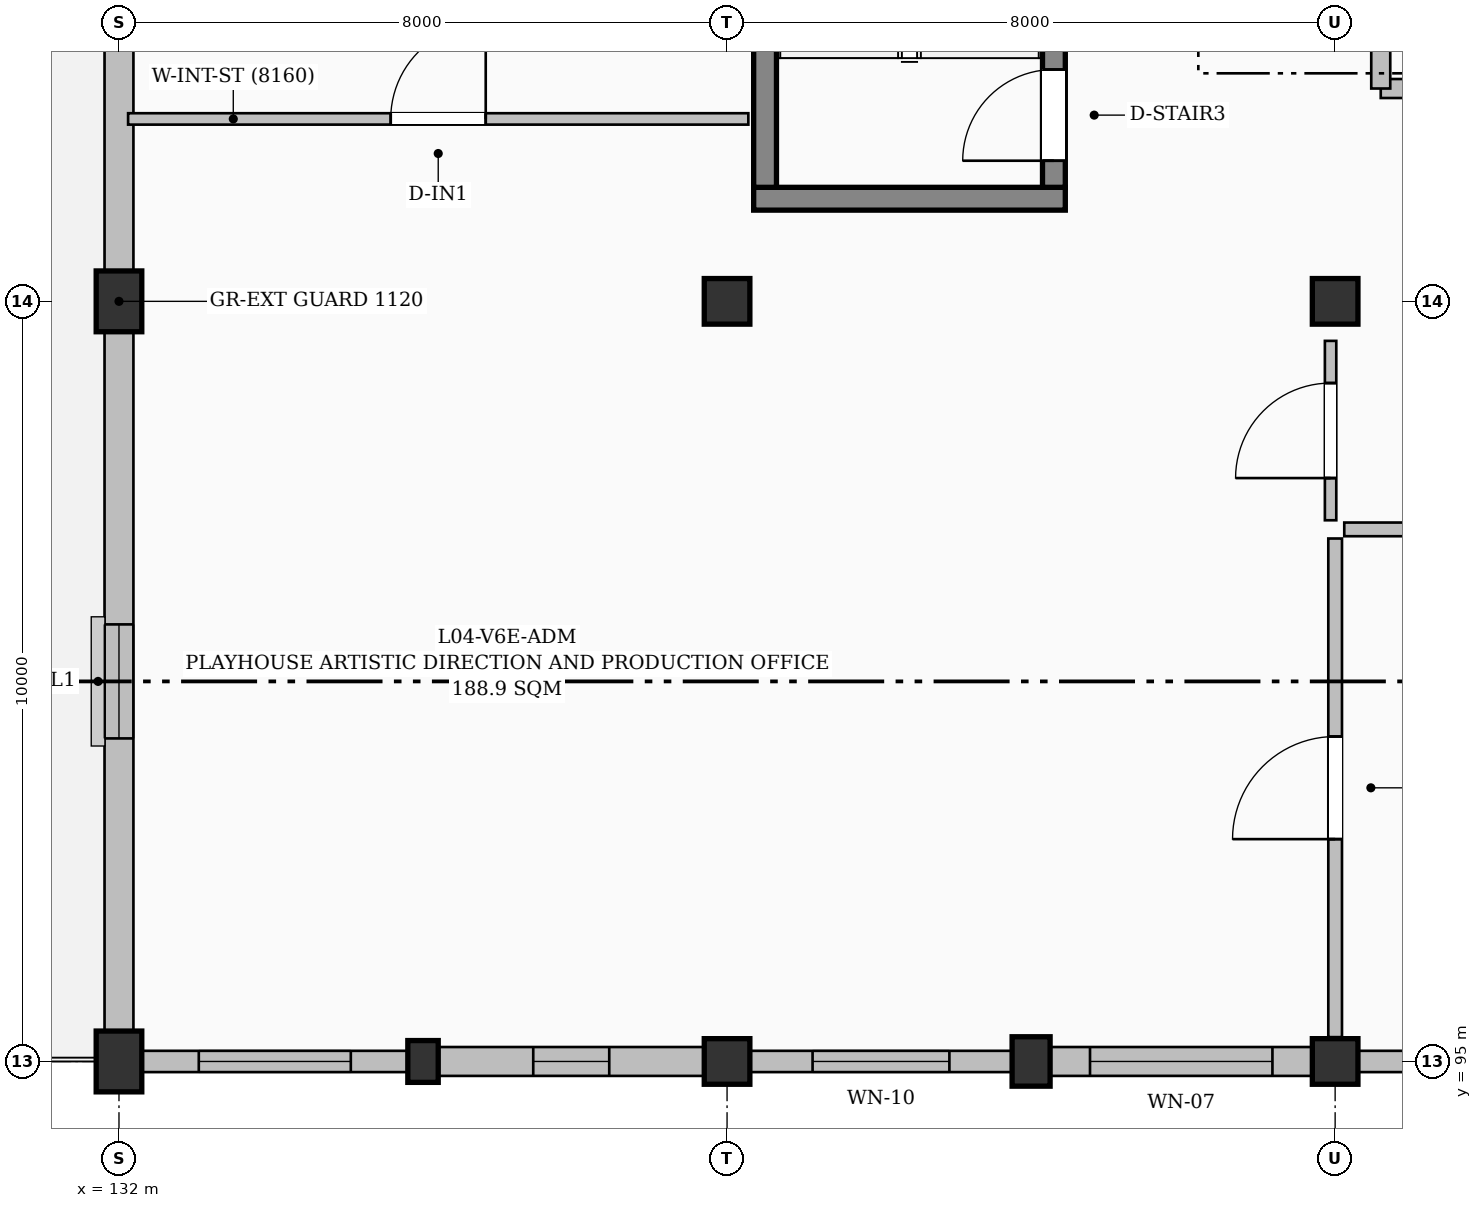
"""IFC4 building model, lengths in metres.
Left out: names, types, materials, properties, quantities, classifications, styles, units other than length and angle.
Written with IfcOpenShell. Run it as: python <this file> out.ifc"""

import sys

from ifc_helpers import new_model, si_unit, direction, frame, frame_2d, origin, origin_2d, place, context, subcontext, project, spatial, rectangle, extrude, element, fill, save


model = new_model("IFC4")
c1 = context("Model", 3, precision=1e-05, world=origin(), true_north=direction((0.0, 1.0)))
c2 = subcontext(c1, "Body", "Model", "MODEL_VIEW")
j1 = project(units=[si_unit("LENGTHUNIT", "METRE"), si_unit("PLANEANGLEUNIT", "RADIAN")], contexts=[c1])
p1 = place(None, origin())
s1 = spatial("IfcSite", under=j1, at=p1, CompositionType="ELEMENT")
p2 = place(p1, origin())
s2 = spatial("IfcBuilding", under=s1, at=p2, CompositionType="ELEMENT")
p3 = place(p2, frame((0.0, 0.0, 18.3)))
s3 = spatial("IfcBuildingStorey", under=s2, at=p3, CompositionType="ELEMENT", Elevation=18.3)
for number, where, z_axis, x_axis in (
    (1, (132.0, 95.0, 0.0), (0.0, 0.0, 1.0), (1.0, 0.0, 0.0)),
    (2, (132.0, 105.0, 0.0), (0.0, 0.0, 1.0), (1.0, 0.0, 0.0)),
):
    element("IfcColumn", number, at=place(p3, frame(where, z_axis=z_axis, x_axis=x_axis)), inside=s3, PredefinedType="COLUMN", context=c2, shape_type="SweptSolid", body=[
        extrude(rectangle(XDim=0.6, YDim=0.8, at=origin_2d()), origin(), (0.0, 0.0, 1.0), 4.5),
    ])
p4 = place(p3, frame((136.0, 95.0, 0.0), z_axis=(0.0, 0.0, 1.0), x_axis=(1.0, 0.0, 0.0)))
e3 = element("IfcColumn", 3, at=p4, inside=s3, PredefinedType="PILASTER", context=c2, shape_type="SweptSolid", body=[
    extrude(rectangle(XDim=0.4, YDim=0.55, at=origin_2d()), origin(), (0.0, 0.0, 1.0), 4.5),
])
for number, where, z_axis, x_axis in (
    (4, (140.0, 95.0, 0.0), (0.0, 0.0, 1.0), (1.0, 0.0, 0.0)),
    (5, (140.0, 105.0, 0.0), (0.0, 0.0, 1.0), (1.0, 0.0, 0.0)),
):
    element("IfcColumn", number, at=place(p3, frame(where, z_axis=z_axis, x_axis=x_axis)), inside=s3, PredefinedType="COLUMN", context=c2, shape_type="SweptSolid", body=[
        extrude(rectangle(XDim=0.6, YDim=0.6, at=origin_2d()), origin(), (0.0, 0.0, 1.0), 4.5),
    ])
p5 = place(p3, frame((144.0, 95.0, 0.0), z_axis=(0.0, 0.0, 1.0), x_axis=(1.0, 0.0, 0.0)))
e6 = element("IfcColumn", 6, at=p5, inside=s3, PredefinedType="PILASTER", context=c2, shape_type="SweptSolid", body=[
    extrude(rectangle(XDim=0.5, YDim=0.65, at=origin_2d()), origin(), (0.0, 0.0, 1.0), 4.5),
])
for number, where, z_axis, x_axis in (
    (7, (148.0, 95.0, 0.0), (0.0, 0.0, 1.0), (1.0, 0.0, 0.0)),
    (8, (148.0, 105.0, 0.0), (0.0, 0.0, 1.0), (1.0, 0.0, 0.0)),
):
    element("IfcColumn", number, at=place(p3, frame(where, z_axis=z_axis, x_axis=x_axis)), inside=s3, PredefinedType="COLUMN", context=c2, shape_type="SweptSolid", body=[
        extrude(rectangle(XDim=0.6, YDim=0.6, at=origin_2d()), origin(), (0.0, 0.0, 1.0), 4.5),
    ])
p6 = place(p3, frame((132.0, 95.4, 0.0), z_axis=(0.0, 0.0, 1.0), x_axis=(0.0, 1.0, 0.0)))
e9 = element("IfcWall", 9, at=p6, inside=s3, PredefinedType="SOLIDWALL", context=c2, shape_type="SweptSolid", body=[
    extrude(rectangle(XDim=9.2, YDim=0.38, at=frame_2d((4.6, 0.0))), origin(), (0.0, 0.0, 1.0), 4.2),
])
p7 = place(p6, frame((3.85, 0.0, 0.95)))
e10 = element("IfcOpeningElement", 10, at=p7, cuts=e9, PredefinedType="OPENING", context=c2, shape_type="SweptSolid", body=[
    extrude(rectangle(XDim=1.5, YDim=1.5, at=frame_2d((0.75, 0.75))), frame((0.0, 0.2, 0.0), z_axis=(0.0, -1.0, 0.0), x_axis=(1.0, 0.0, 0.0)), (0.0, 0.0, 1.0), 0.4),
])
p8 = place(p3, frame((132.0, 105.4, 0.0), z_axis=(0.0, 0.0, 1.0), x_axis=(0.0, 1.0, 0.0)))
e11 = element("IfcWall", 11, at=p8, inside=s3, PredefinedType="SOLIDWALL", context=c2, shape_type="SweptSolid", body=[
    extrude(rectangle(XDim=9.2, YDim=0.38, at=frame_2d((4.6, 0.0))), origin(), (0.0, 0.0, 1.0), 4.2),
])
p9 = place(p8, frame((3.775, 0.0, 0.0)))
e12 = element("IfcOpeningElement", 12, at=p9, cuts=e11, PredefinedType="OPENING", context=c2, shape_type="SweptSolid", body=[
    extrude(rectangle(XDim=1.65, YDim=2.25, at=frame_2d((0.825, 1.125))), frame((0.0, 0.2, 0.0), z_axis=(0.0, -1.0, 0.0), x_axis=(1.0, 0.0, 0.0)), (0.0, 0.0, 1.0), 0.4),
])
p10 = place(p3, frame((151.775, 95.0, 0.0), z_axis=(0.0, 0.0, 1.0), x_axis=(-1.0, 0.0, 0.0)))
e13 = element("IfcWall", 13, at=p10, inside=s3, PredefinedType="SOLIDWALL", context=c2, shape_type="SweptSolid", body=[
    extrude(rectangle(XDim=3.475, YDim=0.28, at=frame_2d((1.737, 0.0))), origin(), (0.0, 0.0, 1.0), 3.885),
])
p11 = place(p10, frame((0.837, 0.0, 0.95)))
e14 = element("IfcOpeningElement", 14, at=p11, cuts=e13, PredefinedType="OPENING", context=c2, shape_type="SweptSolid", body=[
    extrude(rectangle(XDim=1.8, YDim=1.8, at=frame_2d((0.9, 0.9))), frame((0.0, 0.15, 0.0), z_axis=(0.0, -1.0, 0.0), x_axis=(1.0, 0.0, 0.0)), (0.0, 0.0, 1.0), 0.3),
])
p12 = place(p3, frame((147.7, 95.0, 0.0), z_axis=(0.0, 0.0, 1.0), x_axis=(-1.0, 0.0, 0.0)))
e15 = element("IfcWall", 15, at=p12, inside=s3, PredefinedType="SOLIDWALL", context=c2, shape_type="SweptSolid", body=[
    extrude(rectangle(XDim=3.45, YDim=0.38, at=frame_2d((1.725, 0.0))), origin(), (0.0, 0.0, 1.0), 3.585),
])
p13 = place(p12, frame((0.525, 0.0, 0.95)))
e16 = element("IfcOpeningElement", 16, at=p13, cuts=e15, PredefinedType="OPENING", context=c2, shape_type="SweptSolid", body=[
    extrude(rectangle(XDim=2.4, YDim=1.8, at=frame_2d((1.2, 0.9))), frame((0.0, 0.2, 0.0), z_axis=(0.0, -1.0, 0.0), x_axis=(1.0, 0.0, 0.0)), (0.0, 0.0, 1.0), 0.4),
])
p14 = place(p3, frame((143.75, 95.0, 0.0), z_axis=(0.0, 0.0, 1.0), x_axis=(-1.0, 0.0, 0.0)))
e17 = element("IfcWall", 17, at=p14, inside=s3, PredefinedType="SOLIDWALL", context=c2, shape_type="SweptSolid", body=[
    extrude(rectangle(XDim=3.45, YDim=0.28, at=frame_2d((1.725, 0.0))), origin(), (0.0, 0.0, 1.0), 3.585),
])
p15 = place(p14, frame((0.825, 0.0, 0.95)))
e18 = element("IfcOpeningElement", 18, at=p15, cuts=e17, PredefinedType="OPENING", context=c2, shape_type="SweptSolid", body=[
    extrude(rectangle(XDim=1.8, YDim=1.5, at=frame_2d((0.9, 0.75))), frame((0.0, 0.15, 0.0), z_axis=(0.0, -1.0, 0.0), x_axis=(1.0, 0.0, 0.0)), (0.0, 0.0, 1.0), 0.3),
])
p16 = place(p3, frame((139.7, 95.0, 0.0), z_axis=(0.0, 0.0, 1.0), x_axis=(-1.0, 0.0, 0.0)))
e19 = element("IfcWall", 19, at=p16, inside=s3, PredefinedType="SOLIDWALL", context=c2, shape_type="SweptSolid", body=[
    extrude(rectangle(XDim=3.5, YDim=0.38, at=frame_2d((1.75, 0.0))), origin(), (0.0, 0.0, 1.0), 4.2),
])
p17 = place(p16, frame((1.25, 0.0, 0.95)))
e20 = element("IfcOpeningElement", 20, at=p17, cuts=e19, PredefinedType="OPENING", context=c2, shape_type="SweptSolid", body=[
    extrude(rectangle(XDim=1.0, YDim=1.4, at=frame_2d((0.5, 0.7))), frame((0.0, 0.2, 0.0), z_axis=(0.0, -1.0, 0.0), x_axis=(1.0, 0.0, 0.0)), (0.0, 0.0, 1.0), 0.4),
])
p18 = place(p3, frame((135.8, 95.0, 0.0), z_axis=(0.0, 0.0, 1.0), x_axis=(-1.0, 0.0, 0.0)))
e21 = element("IfcWall", 21, at=p18, inside=s3, PredefinedType="SOLIDWALL", context=c2, shape_type="SweptSolid", body=[
    extrude(rectangle(XDim=3.5, YDim=0.28, at=frame_2d((1.75, 0.0))), origin(), (0.0, 0.0, 1.0), 4.2),
])
p19 = place(p18, frame((0.75, 0.0, 0.95)))
e22 = element("IfcOpeningElement", 22, at=p19, cuts=e21, PredefinedType="OPENING", context=c2, shape_type="SweptSolid", body=[
    extrude(rectangle(XDim=2.0, YDim=1.2, at=frame_2d((1.0, 0.6))), frame((0.0, 0.15, 0.0), z_axis=(0.0, -1.0, 0.0), x_axis=(1.0, 0.0, 0.0)), (0.0, 0.0, 1.0), 0.3),
])
p20 = place(p3, frame((140.35, 106.35, 0.0), z_axis=(0.0, 0.0, 1.0), x_axis=(1.0, 0.0, 0.0)))
e23 = element("IfcWall", 23, at=p20, inside=s3, PredefinedType="SHEAR", context=c2, shape_type="SweptSolid", body=[
    extrude(rectangle(XDim=4.1, YDim=0.3, at=frame_2d((2.05, 0.0))), origin(), (0.0, 0.0, 1.0), 4.2),
])
p21 = place(p3, frame((140.5, 106.5, 0.0), z_axis=(0.0, 0.0, 1.0), x_axis=(0.0, 1.0, 0.0)))
e24 = element("IfcWall", 24, at=p21, inside=s3, PredefinedType="SHEAR", context=c2, shape_type="SweptSolid", body=[
    extrude(rectangle(XDim=7.32, YDim=0.3, at=frame_2d((3.66, 0.0))), origin(), (0.0, 0.0, 1.0), 4.2),
])
p22 = place(p3, frame((144.3, 106.5, 0.0), z_axis=(0.0, 0.0, 1.0), x_axis=(0.0, 1.0, 0.0)))
e25 = element("IfcWall", 25, at=p22, inside=s3, PredefinedType="SHEAR", context=c2, shape_type="SweptSolid", body=[
    extrude(rectangle(XDim=7.32, YDim=0.3, at=frame_2d((3.66, 0.0))), origin(), (0.0, 0.0, 1.0), 4.2),
])
p23 = place(p22, frame((0.35, 0.0, 0.0)))
e26 = element("IfcOpeningElement", 26, at=p23, cuts=e25, PredefinedType="OPENING", context=c2, shape_type="SweptSolid", body=[
    extrude(rectangle(XDim=1.2, YDim=2.15, at=frame_2d((0.6, 1.075))), frame((0.0, 0.16, 0.0), z_axis=(0.0, -1.0, 0.0), x_axis=(1.0, 0.0, 0.0)), (0.0, 0.0, 1.0), 0.32),
])
p24 = place(p3, frame((152.2, 107.8, 0.0), z_axis=(0.0, 0.0, 1.0), x_axis=(-1.0, 0.0, 0.0)))
e27 = element("IfcWall", 27, at=p24, inside=s3, PredefinedType="SOLIDWALL", context=c2, shape_type="SweptSolid", body=[
    extrude(rectangle(XDim=3.6, YDim=0.25, at=frame_2d((1.8, 0.0))), origin(), (0.0, 0.0, 1.0), 4.2),
])
p25 = place(p24, frame((1.225, 0.0, 0.0)))
e28 = element("IfcOpeningElement", 28, at=p25, cuts=e27, PredefinedType="OPENING", context=c2, shape_type="SweptSolid", body=[
    extrude(rectangle(XDim=1.15, YDim=2.15, at=frame_2d((0.575, 1.075))), frame((0.0, 0.135, 0.0), z_axis=(0.0, -1.0, 0.0), x_axis=(1.0, 0.0, 0.0)), (0.0, 0.0, 1.0), 0.27),
])
p26 = place(p3, frame((148.6, 107.8, 0.0), z_axis=(0.0, 0.0, 1.0), x_axis=(0.0, 1.0, 0.0)))
e29 = element("IfcWall", 29, at=p26, inside=s3, PredefinedType="SOLIDWALL", context=c2, shape_type="SweptSolid", body=[
    extrude(rectangle(XDim=3.6, YDim=0.25, at=frame_2d((1.8, 0.0))), origin(), (0.0, 0.0, 1.0), 4.2),
])
p27 = place(p3, frame((148.0, 95.32, 0.0), z_axis=(0.0, 0.0, 1.0), x_axis=(0.0, 1.0, 0.0)))
e30 = element("IfcWall", 30, at=p27, inside=s3, PredefinedType="PARTITIONING", context=c2, shape_type="SweptSolid", body=[
    extrude(rectangle(XDim=6.56, YDim=0.18, at=frame_2d((3.28, 0.0))), origin(), (0.0, 0.0, 1.0), 3.335),
])
p28 = place(p27, frame((2.605, 0.0, 0.0)))
e31 = element("IfcOpeningElement", 31, at=p28, cuts=e30, PredefinedType="OPENING", context=c2, shape_type="SweptSolid", body=[
    extrude(rectangle(XDim=1.35, YDim=2.2, at=frame_2d((0.675, 1.1))), frame((0.0, 0.1, 0.0), z_axis=(0.0, -1.0, 0.0), x_axis=(1.0, 0.0, 0.0)), (0.0, 0.0, 1.0), 0.2),
])
p29 = place(p3, frame((132.12, 107.4, 0.0), z_axis=(0.0, 0.0, 1.0), x_axis=(1.0, 0.0, 0.0)))
e32 = element("IfcWall", 32, at=p29, inside=s3, PredefinedType="PARTITIONING", context=c2, shape_type="SweptSolid", body=[
    extrude(rectangle(XDim=8.16, YDim=0.15, at=frame_2d((4.08, 0.0))), origin(), (0.0, 0.0, 1.0), 4.2),
])
p30 = place(p29, frame((3.455, 0.0, 0.0)))
e33 = element("IfcOpeningElement", 33, at=p30, cuts=e32, PredefinedType="OPENING", context=c2, shape_type="SweptSolid", body=[
    extrude(rectangle(XDim=1.25, YDim=2.15, at=frame_2d((0.625, 1.075))), frame((0.0, 0.085, 0.0), z_axis=(0.0, -1.0, 0.0), x_axis=(1.0, 0.0, 0.0)), (0.0, 0.0, 1.0), 0.17),
])
p31 = place(p3, frame((147.94, 102.12, 0.0), z_axis=(0.0, 0.0, 1.0), x_axis=(0.0, 1.0, 0.0)))
e34 = element("IfcWall", 34, at=p31, inside=s3, PredefinedType="PARTITIONING", context=c2, shape_type="SweptSolid", body=[
    extrude(rectangle(XDim=2.36, YDim=0.15, at=frame_2d((1.18, 0.0))), origin(), (0.0, 0.0, 1.0), 3.335),
])
p32 = place(p31, frame((0.555, 0.0, 0.0)))
e35 = element("IfcOpeningElement", 35, at=p32, cuts=e34, PredefinedType="OPENING", context=c2, shape_type="SweptSolid", body=[
    extrude(rectangle(XDim=1.25, YDim=2.15, at=frame_2d((0.625, 1.075))), frame((0.0, 0.085, 0.0), z_axis=(0.0, -1.0, 0.0), x_axis=(1.0, 0.0, 0.0)), (0.0, 0.0, 1.0), 0.17),
])
p33 = place(p3, frame((148.12, 102.0, 0.0), z_axis=(0.0, 0.0, 1.0), x_axis=(1.0, 0.0, 0.0)))
e36 = element("IfcWall", 36, at=p33, inside=s3, PredefinedType="PARTITIONING", context=c2, shape_type="SweptSolid", body=[
    extrude(rectangle(XDim=11.76, YDim=0.18, at=frame_2d((5.88, 0.0))), origin(), (0.0, 0.0, 1.0), 3.785),
])
p34 = place(p33, frame((5.205, 0.0, 0.0)))
e37 = element("IfcOpeningElement", 37, at=p34, cuts=e36, PredefinedType="OPENING", context=c2, shape_type="SweptSolid", body=[
    extrude(rectangle(XDim=1.35, YDim=2.2, at=frame_2d((0.675, 1.1))), frame((0.0, 0.1, 0.0), z_axis=(0.0, -1.0, 0.0), x_axis=(1.0, 0.0, 0.0)), (0.0, 0.0, 1.0), 0.2),
])
p35 = place(p7, origin())
e38 = element("IfcWindow", 38, at=p35, inside=s3, PartitioningType="DOUBLE_PANEL_VERTICAL", PredefinedType="WINDOW", context=c2, shape_type="SweptSolid", body=[
    extrude(rectangle(XDim=1.5, YDim=1.5, at=frame_2d((0.75, 0.75))), frame((0.0, 0.03, 0.0), z_axis=(0.0, -1.0, 0.0), x_axis=(1.0, 0.0, 0.0)), (0.0, 0.0, 1.0), 0.06),
])
fill(e10, e38)
p36 = place(p13, origin())
e39 = element("IfcWindow", 39, at=p36, inside=s3, PartitioningType="TRIPLE_PANEL_VERTICAL", PredefinedType="WINDOW", context=c2, shape_type="SweptSolid", body=[
    extrude(rectangle(XDim=2.4, YDim=1.8, at=frame_2d((1.2, 0.9))), frame((0.0, 0.03, 0.0), z_axis=(0.0, -1.0, 0.0), x_axis=(1.0, 0.0, 0.0)), (0.0, 0.0, 1.0), 0.06),
])
fill(e16, e39)
p37 = place(p15, origin())
e40 = element("IfcWindow", 40, at=p37, inside=s3, PartitioningType="DOUBLE_PANEL_VERTICAL", PredefinedType="WINDOW", context=c2, shape_type="SweptSolid", body=[
    extrude(rectangle(XDim=1.8, YDim=1.5, at=frame_2d((0.9, 0.75))), frame((0.0, 0.03, 0.0), z_axis=(0.0, -1.0, 0.0), x_axis=(1.0, 0.0, 0.0)), (0.0, 0.0, 1.0), 0.06),
])
fill(e18, e40)
p38 = place(p17, origin())
e41 = element("IfcWindow", 41, at=p38, inside=s3, PartitioningType="SINGLE_PANEL", PredefinedType="WINDOW", context=c2, shape_type="SweptSolid", body=[
    extrude(rectangle(XDim=1.0, YDim=1.4, at=frame_2d((0.5, 0.7))), frame((0.0, 0.03, 0.0), z_axis=(0.0, -1.0, 0.0), x_axis=(1.0, 0.0, 0.0)), (0.0, 0.0, 1.0), 0.06),
])
fill(e20, e41)
p39 = place(p19, origin())
e42 = element("IfcWindow", 42, at=p39, inside=s3, PartitioningType="DOUBLE_PANEL_HORIZONTAL", PredefinedType="WINDOW", context=c2, shape_type="SweptSolid", body=[
    extrude(rectangle(XDim=2.0, YDim=1.2, at=frame_2d((1.0, 0.6))), frame((0.0, 0.03, 0.0), z_axis=(0.0, -1.0, 0.0), x_axis=(1.0, 0.0, 0.0)), (0.0, 0.0, 1.0), 0.06),
])
fill(e22, e42)
p40 = place(p23, origin())
e43 = element("IfcDoor", 43, at=p40, inside=s3, OperationType="SINGLE_SWING_LEFT", PredefinedType="DOOR", context=c2, shape_type="SweptSolid", body=[
    extrude(rectangle(XDim=1.2, YDim=2.15, at=frame_2d((0.6, 1.075))), frame((0.0, 0.025, 0.0), z_axis=(0.0, -1.0, 0.0), x_axis=(1.0, 0.0, 0.0)), (0.0, 0.0, 1.0), 0.05),
])
fill(e26, e43)
p41 = place(p28, origin())
e44 = element("IfcDoor", 44, at=p41, inside=s3, OperationType="SINGLE_SWING_LEFT", PredefinedType="DOOR", context=c2, shape_type="SweptSolid", body=[
    extrude(rectangle(XDim=1.35, YDim=2.2, at=frame_2d((0.675, 1.1))), frame((0.0, 0.025, 0.0), z_axis=(0.0, -1.0, 0.0), x_axis=(1.0, 0.0, 0.0)), (0.0, 0.0, 1.0), 0.05),
])
fill(e31, e44)
p42 = place(p30, origin())
e45 = element("IfcDoor", 45, at=p42, inside=s3, OperationType="SINGLE_SWING_RIGHT", PredefinedType="DOOR", context=c2, shape_type="SweptSolid", body=[
    extrude(rectangle(XDim=1.25, YDim=2.15, at=frame_2d((0.625, 1.075))), frame((0.0, 0.025, 0.0), z_axis=(0.0, -1.0, 0.0), x_axis=(1.0, 0.0, 0.0)), (0.0, 0.0, 1.0), 0.05),
])
fill(e33, e45)
p43 = place(p32, origin())
e46 = element("IfcDoor", 46, at=p43, inside=s3, OperationType="SINGLE_SWING_LEFT", PredefinedType="DOOR", context=c2, shape_type="SweptSolid", body=[
    extrude(rectangle(XDim=1.25, YDim=2.15, at=frame_2d((0.625, 1.075))), frame((0.0, 0.025, 0.0), z_axis=(0.0, -1.0, 0.0), x_axis=(1.0, 0.0, 0.0)), (0.0, 0.0, 1.0), 0.05),
])
fill(e35, e46)
save(model, sys.argv[1])
